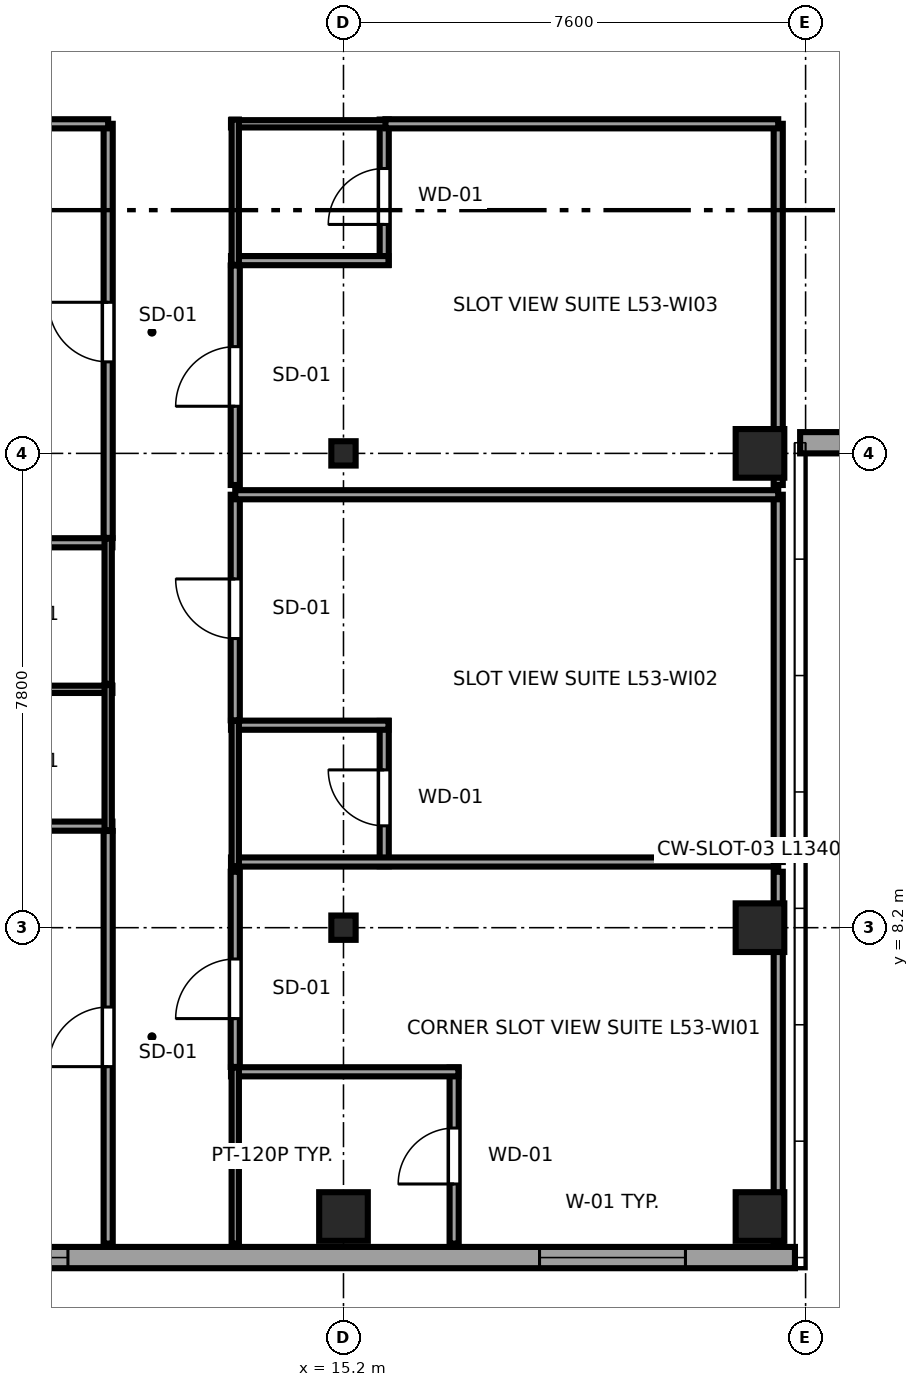
"""IFC4 building model, lengths in metres.
Left out: names, types, materials, properties, quantities, classifications, styles, units other than length and angle.
Written with IfcOpenShell. Run it as: python <this file> out.ifc"""

import sys

from ifc_helpers import new_model, si_unit, direction, frame, frame_2d, origin, origin_2d, place, context, subcontext, project, spatial, rectangle, i_section, extrude, source, transform, mapped, element, fill, save


model = new_model("IFC4")
c1 = context("Model", 3, precision=1e-05, world=origin(), true_north=direction((0.0, 1.0)))
c2 = subcontext(c1, "Body", "Model", "MODEL_VIEW")
j1 = project(units=[si_unit("LENGTHUNIT", "METRE"), si_unit("PLANEANGLEUNIT", "RADIAN")], contexts=[c1])
p1 = place(None, origin())
s1 = spatial("IfcSite", under=j1, at=p1, CompositionType="ELEMENT")
p2 = place(p1, origin())
s2 = spatial("IfcBuilding", under=s1, at=p2, CompositionType="ELEMENT")
p3 = place(p2, frame((0.0, 0.0, 201.75)))
s3 = spatial("IfcBuildingStorey", under=s2, at=p3, CompositionType="ELEMENT", Elevation=201.75)
m1 = source(origin(), c2, "Body", "SweptSolid", [
    extrude(rectangle(XDim=0.8, YDim=0.8, at=origin_2d()), origin(), (0.0, 0.0, 1.0), 3.55),
])
p4 = place(p3, frame((15.2, 3.45, 0.0), z_axis=(0.0, 0.0, 1.0), x_axis=(1.0, 0.0, 0.0)))
e1 = element("IfcColumn", 1, at=p4, inside=s3, PredefinedType="COLUMN", context=c2, shape_type="MappedRepresentation", body=[
    mapped(m1, transform((0.0, 0.0, 0.0), x_axis=(1.0, 0.0, 0.0), y_axis=(0.0, 1.0, 0.0), z_axis=(0.0, 0.0, 1.0), scale=1.0)),
])
m2 = source(origin(), c2, "Body", "SweptSolid", [
    extrude(i_section(OverallWidth=0.4, OverallDepth=0.4, WebThickness=0.02, FlangeThickness=0.035, at=origin_2d()), origin(), (0.0, 0.0, 1.0), 3.55),
])
for number, where, z_axis, x_axis in (
    (2, (15.2, 8.2, 0.0), (0.0, 0.0, 1.0), (1.0, 0.0, 0.0)),
    (3, (15.2, 16.0, 0.0), (0.0, 0.0, 1.0), (1.0, 0.0, 0.0)),
):
    element("IfcColumn", number, at=place(p3, frame(where, z_axis=z_axis, x_axis=x_axis)), inside=s3, PredefinedType="COLUMN", context=c2, shape_type="MappedRepresentation", body=[
        mapped(m2, transform((0.0, 0.0, 0.0), x_axis=(1.0, 0.0, 0.0), y_axis=(0.0, 1.0, 0.0), z_axis=(0.0, 0.0, 1.0), scale=1.0)),
    ])
for number, where, z_axis, x_axis in (
    (4, (22.05, 3.45, 0.0), (0.0, 0.0, 1.0), (1.0, 0.0, 0.0)),
    (5, (22.05, 8.2, 0.0), (0.0, 0.0, 1.0), (1.0, 0.0, 0.0)),
    (6, (22.05, 16.0, 0.0), (0.0, 0.0, 1.0), (1.0, 0.0, 0.0)),
):
    element("IfcColumn", number, at=place(p3, frame(where, z_axis=z_axis, x_axis=x_axis)), inside=s3, PredefinedType="COLUMN", context=c2, shape_type="MappedRepresentation", body=[
        mapped(m1, transform((0.0, 0.0, 0.0), x_axis=(1.0, 0.0, 0.0), y_axis=(0.0, 1.0, 0.0), z_axis=(0.0, 0.0, 1.0), scale=1.0)),
    ])
p5 = place(p3, frame((7.017, 2.775, 0.0), z_axis=(0.0, 0.0, 1.0), x_axis=(1.0, 0.0, 0.0)))
e7 = element("IfcWall", 7, at=p5, inside=s3, PredefinedType="SOLIDWALL", context=c2, shape_type="SweptSolid", body=[
    extrude(rectangle(XDim=15.608, YDim=0.35, at=frame_2d((7.804, 0.0))), origin(), (0.0, 0.0, 1.0), 3.29),
])
p6 = place(p5, frame((1.251, 0.0, 0.68)))
e8 = element("IfcOpeningElement", 8, at=p6, cuts=e7, PredefinedType="OPENING", context=c2, shape_type="SweptSolid", body=[
    extrude(rectangle(XDim=2.4, YDim=1.9, at=frame_2d((1.2, 0.95))), frame((0.0, 0.185, 0.0), z_axis=(0.0, -1.0, 0.0), x_axis=(1.0, 0.0, 0.0)), (0.0, 0.0, 1.0), 0.37),
])
p7 = place(p5, frame((11.407, 0.0, 0.68)))
e9 = element("IfcOpeningElement", 9, at=p7, cuts=e7, PredefinedType="OPENING", context=c2, shape_type="SweptSolid", body=[
    extrude(rectangle(XDim=2.4, YDim=1.9, at=frame_2d((1.2, 0.95))), frame((0.0, 0.185, 0.0), z_axis=(0.0, -1.0, 0.0), x_axis=(1.0, 0.0, 0.0)), (0.0, 0.0, 1.0), 0.37),
])
p8 = place(p3, frame((22.71, 16.175, 0.0), z_axis=(0.0, 0.0, 1.0), x_axis=(1.0, 0.0, 0.0)))
e10 = element("IfcWall", 10, at=p8, inside=s3, PredefinedType="SOLIDWALL", context=c2, shape_type="SweptSolid", body=[
    extrude(rectangle(XDim=11.58, YDim=0.35, at=frame_2d((5.79, 0.0))), origin(), (0.0, 0.0, 1.0), 2.08),
])
p9 = place(p3, frame((8.81, 9.87, 0.0), z_axis=(0.0, 0.0, 1.0), x_axis=(1.0, 0.0, 0.0)))
e11 = element("IfcWall", 11, at=p9, inside=s3, PredefinedType="PARTITIONING", context=c2, shape_type="SweptSolid", body=[
    extrude(rectangle(XDim=2.59, YDim=0.15, at=frame_2d((1.295, 0.0))), origin(), (0.0, 0.0, 1.0), 3.29),
])
p10 = place(p3, frame((8.81, 12.12, 0.0), z_axis=(0.0, 0.0, 1.0), x_axis=(1.0, 0.0, 0.0)))
e12 = element("IfcWall", 12, at=p10, inside=s3, PredefinedType="PLUMBINGWALL", context=c2, shape_type="SweptSolid", body=[
    extrude(rectangle(XDim=2.59, YDim=0.12, at=frame_2d((1.295, 0.0))), origin(), (0.0, 0.0, 1.0), 3.29),
])
p11 = place(p3, frame((11.33, 9.8, 0.0), z_axis=(0.0, 0.0, 1.0), x_axis=(0.0, 1.0, 0.0)))
e13 = element("IfcWall", 13, at=p11, inside=s3, PredefinedType="PLUMBINGWALL", context=c2, shape_type="SweptSolid", body=[
    extrude(rectangle(XDim=2.39, YDim=0.12, at=frame_2d((1.195, 0.0))), origin(), (0.0, 0.0, 1.0), 2.921),
])
p12 = place(p3, frame((8.81, 14.53, 0.0), z_axis=(0.0, 0.0, 1.0), x_axis=(1.0, 0.0, 0.0)))
e14 = element("IfcWall", 14, at=p12, inside=s3, PredefinedType="PARTITIONING", context=c2, shape_type="SweptSolid", body=[
    extrude(rectangle(XDim=2.59, YDim=0.15, at=frame_2d((1.295, 0.0))), origin(), (0.0, 0.0, 1.0), 3.29),
])
p13 = place(p3, frame((11.33, 12.21, 0.0), z_axis=(0.0, 0.0, 1.0), x_axis=(0.0, 1.0, 0.0)))
e15 = element("IfcWall", 15, at=p13, inside=s3, PredefinedType="PLUMBINGWALL", context=c2, shape_type="SweptSolid", body=[
    extrude(rectangle(XDim=2.39, YDim=0.12, at=frame_2d((1.195, 0.0))), origin(), (0.0, 0.0, 1.0), 2.921),
])
p14 = place(p3, frame((17.02, 3.005, 0.0), z_axis=(0.0, 0.0, 1.0), x_axis=(0.0, 1.0, 0.0)))
e16 = element("IfcWall", 16, at=p14, inside=s3, PredefinedType="PARTITIONING", context=c2, shape_type="SweptSolid", body=[
    extrude(rectangle(XDim=2.895, YDim=0.15, at=frame_2d((1.448, 0.0))), origin(), (0.0, 0.0, 1.0), 3.29),
])
p15 = place(p14, frame((0.98, 0.0, 0.0)))
e17 = element("IfcOpeningElement", 17, at=p15, cuts=e16, PredefinedType="OPENING", context=c2, shape_type="SweptSolid", body=[
    extrude(rectangle(XDim=0.92, YDim=2.01, at=frame_2d((0.46, 1.005))), frame((0.0, 0.085, 0.0), z_axis=(0.0, -1.0, 0.0), x_axis=(1.0, 0.0, 0.0)), (0.0, 0.0, 1.0), 0.17),
])
p16 = place(p3, frame((13.35, 5.83, 0.0), z_axis=(0.0, 0.0, 1.0), x_axis=(1.0, 0.0, 0.0)))
e18 = element("IfcWall", 18, at=p16, inside=s3, PredefinedType="PARTITIONING", context=c2, shape_type="SweptSolid", body=[
    extrude(rectangle(XDim=3.74, YDim=0.15, at=frame_2d((1.87, 0.0))), origin(), (0.0, 0.0, 1.0), 3.29),
])
p17 = place(p3, frame((13.42, 3.005, 0.0), z_axis=(0.0, 0.0, 1.0), x_axis=(0.0, 1.0, 0.0)))
e19 = element("IfcWall", 19, at=p17, inside=s3, PredefinedType="PLUMBINGWALL", context=c2, shape_type="SweptSolid", body=[
    extrude(rectangle(XDim=2.895, YDim=0.12, at=frame_2d((1.448, 0.0))), origin(), (0.0, 0.0, 1.0), 3.29),
])
p18 = place(p3, frame((15.87, 9.21, 0.0), z_axis=(0.0, 0.0, 1.0), x_axis=(0.0, 1.0, 0.0)))
e20 = element("IfcWall", 20, at=p18, inside=s3, PredefinedType="PARTITIONING", context=c2, shape_type="SweptSolid", body=[
    extrude(rectangle(XDim=2.39, YDim=0.15, at=frame_2d((1.195, 0.0))), origin(), (0.0, 0.0, 1.0), 3.29),
])
p19 = place(p18, frame((0.665, 0.0, 0.0)))
e21 = element("IfcOpeningElement", 21, at=p19, cuts=e20, PredefinedType="OPENING", context=c2, shape_type="SweptSolid", body=[
    extrude(rectangle(XDim=0.92, YDim=2.01, at=frame_2d((0.46, 1.005))), frame((0.0, 0.085, 0.0), z_axis=(0.0, -1.0, 0.0), x_axis=(1.0, 0.0, 0.0)), (0.0, 0.0, 1.0), 0.17),
])
p20 = place(p3, frame((13.35, 9.28, 0.0), z_axis=(0.0, 0.0, 1.0), x_axis=(1.0, 0.0, 0.0)))
e22 = element("IfcWall", 22, at=p20, inside=s3, PredefinedType="PARTITIONING", context=c2, shape_type="SweptSolid", body=[
    extrude(rectangle(XDim=9.0, YDim=0.15, at=frame_2d((4.5, 0.0))), origin(), (0.0, 0.0, 1.0), 3.29),
])
p21 = place(p3, frame((13.35, 11.53, 0.0), z_axis=(0.0, 0.0, 1.0), x_axis=(1.0, 0.0, 0.0)))
e23 = element("IfcWall", 23, at=p21, inside=s3, PredefinedType="PARTITIONING", context=c2, shape_type="SweptSolid", body=[
    extrude(rectangle(XDim=2.59, YDim=0.15, at=frame_2d((1.295, 0.0))), origin(), (0.0, 0.0, 1.0), 3.29),
])
p22 = place(p3, frame((13.42, 9.21, 0.0), z_axis=(0.0, 0.0, 1.0), x_axis=(0.0, 1.0, 0.0)))
e24 = element("IfcWall", 24, at=p22, inside=s3, PredefinedType="PLUMBINGWALL", context=c2, shape_type="SweptSolid", body=[
    extrude(rectangle(XDim=2.39, YDim=0.12, at=frame_2d((1.195, 0.0))), origin(), (0.0, 0.0, 1.0), 3.29),
])
p23 = place(p3, frame((15.87, 19.1, 0.0), z_axis=(0.0, 0.0, 1.0), x_axis=(0.0, 1.0, 0.0)))
e25 = element("IfcWall", 25, at=p23, inside=s3, PredefinedType="PARTITIONING", context=c2, shape_type="SweptSolid", body=[
    extrude(rectangle(XDim=2.39, YDim=0.15, at=frame_2d((1.195, 0.0))), origin(), (0.0, 0.0, 1.0), 3.29),
])
p24 = place(p23, frame((0.665, 0.0, 0.0)))
e26 = element("IfcOpeningElement", 26, at=p24, cuts=e25, PredefinedType="OPENING", context=c2, shape_type="SweptSolid", body=[
    extrude(rectangle(XDim=0.92, YDim=2.01, at=frame_2d((0.46, 1.005))), frame((0.0, 0.085, 0.0), z_axis=(0.0, -1.0, 0.0), x_axis=(1.0, 0.0, 0.0)), (0.0, 0.0, 1.0), 0.17),
])
p25 = place(p3, frame((13.35, 19.17, 0.0), z_axis=(0.0, 0.0, 1.0), x_axis=(1.0, 0.0, 0.0)))
e27 = element("IfcWall", 27, at=p25, inside=s3, PredefinedType="PARTITIONING", context=c2, shape_type="SweptSolid", body=[
    extrude(rectangle(XDim=2.59, YDim=0.15, at=frame_2d((1.295, 0.0))), origin(), (0.0, 0.0, 1.0), 3.29),
])
p26 = place(p3, frame((13.35, 21.42, 0.0), z_axis=(0.0, 0.0, 1.0), x_axis=(1.0, 0.0, 0.0)))
e28 = element("IfcWall", 28, at=p26, inside=s3, PredefinedType="PLUMBINGWALL", context=c2, shape_type="SweptSolid", body=[
    extrude(rectangle(XDim=2.59, YDim=0.12, at=frame_2d((1.295, 0.0))), origin(), (0.0, 0.0, 1.0), 3.29),
])
p27 = place(p3, frame((13.42, 19.1, 0.0), z_axis=(0.0, 0.0, 1.0), x_axis=(0.0, 1.0, 0.0)))
e29 = element("IfcWall", 29, at=p27, inside=s3, PredefinedType="PLUMBINGWALL", context=c2, shape_type="SweptSolid", body=[
    extrude(rectangle(XDim=2.39, YDim=0.12, at=frame_2d((1.195, 0.0))), origin(), (0.0, 0.0, 1.0), 3.29),
])
p28 = place(p3, frame((11.33, 3.005, 0.0), z_axis=(0.0, 0.0, 1.0), x_axis=(0.0, 1.0, 0.0)))
e30 = element("IfcWall", 30, at=p28, inside=s3, PredefinedType="PARTITIONING", context=c2, shape_type="SweptSolid", body=[
    extrude(rectangle(XDim=6.785, YDim=0.15, at=frame_2d((3.393, 0.0))), origin(), (0.0, 0.0, 1.0), 2.921),
])
p29 = place(p28, frame((2.91, 0.0, 0.0)))
e31 = element("IfcOpeningElement", 31, at=p29, cuts=e30, PredefinedType="OPENING", context=c2, shape_type="SweptSolid", body=[
    extrude(rectangle(XDim=0.98, YDim=2.12, at=frame_2d((0.49, 1.06))), frame((0.0, 0.085, 0.0), z_axis=(0.0, -1.0, 0.0), x_axis=(1.0, 0.0, 0.0)), (0.0, 0.0, 1.0), 0.17),
])
p30 = place(p3, frame((11.33, 14.61, 0.0), z_axis=(0.0, 0.0, 1.0), x_axis=(0.0, 1.0, 0.0)))
e32 = element("IfcWall", 32, at=p30, inside=s3, PredefinedType="PARTITIONING", context=c2, shape_type="SweptSolid", body=[
    extrude(rectangle(XDim=6.81, YDim=0.15, at=frame_2d((3.405, 0.0))), origin(), (0.0, 0.0, 1.0), 2.921),
])
p31 = place(p30, frame((2.895, 0.0, 0.0)))
e33 = element("IfcOpeningElement", 33, at=p31, cuts=e32, PredefinedType="OPENING", context=c2, shape_type="SweptSolid", body=[
    extrude(rectangle(XDim=0.98, YDim=2.12, at=frame_2d((0.49, 1.06))), frame((0.0, 0.085, 0.0), z_axis=(0.0, -1.0, 0.0), x_axis=(1.0, 0.0, 0.0)), (0.0, 0.0, 1.0), 0.17),
])
p32 = place(p3, frame((3.005, 21.42, 0.0), z_axis=(0.0, 0.0, 1.0), x_axis=(1.0, 0.0, 0.0)))
e34 = element("IfcWall", 34, at=p32, inside=s3, PredefinedType="PARTITIONING", context=c2, shape_type="SweptSolid", body=[
    extrude(rectangle(XDim=8.325, YDim=0.15, at=frame_2d((4.163, 0.0))), origin(), (0.0, 0.0, 1.0), 3.29),
])
p33 = place(p3, frame((13.42, 5.91, 0.0), z_axis=(0.0, 0.0, 1.0), x_axis=(0.0, 1.0, 0.0)))
e35 = element("IfcWall", 35, at=p33, inside=s3, PredefinedType="PARTITIONING", context=c2, shape_type="SweptSolid", body=[
    extrude(rectangle(XDim=3.21, YDim=0.15, at=frame_2d((1.605, 0.0))), origin(), (0.0, 0.0, 1.0), 3.29),
])
p34 = place(p33, frame((0.795, 0.0, 0.0)))
e36 = element("IfcOpeningElement", 36, at=p34, cuts=e35, PredefinedType="OPENING", context=c2, shape_type="SweptSolid", body=[
    extrude(rectangle(XDim=0.98, YDim=2.12, at=frame_2d((0.49, 1.06))), frame((0.0, 0.085, 0.0), z_axis=(0.0, -1.0, 0.0), x_axis=(1.0, 0.0, 0.0)), (0.0, 0.0, 1.0), 0.17),
])
p35 = place(p3, frame((22.35, 3.005, 0.0), z_axis=(0.0, 0.0, 1.0), x_axis=(0.0, 1.0, 0.0)))
e37 = element("IfcWall", 37, at=p35, inside=s3, PredefinedType="PARTITIONING", context=c2, shape_type="SweptSolid", body=[
    extrude(rectangle(XDim=6.115, YDim=0.15, at=frame_2d((3.058, 0.0))), origin(), (0.0, 0.0, 1.0), 2.08),
])
p36 = place(p3, frame((13.42, 11.61, 0.0), z_axis=(0.0, 0.0, 1.0), x_axis=(0.0, 1.0, 0.0)))
e38 = element("IfcWall", 38, at=p36, inside=s3, PredefinedType="PARTITIONING", context=c2, shape_type="SweptSolid", body=[
    extrude(rectangle(XDim=3.71, YDim=0.15, at=frame_2d((1.855, 0.0))), origin(), (0.0, 0.0, 1.0), 3.29),
])
p37 = place(p36, frame((1.345, 0.0, 0.0)))
e39 = element("IfcOpeningElement", 39, at=p37, cuts=e38, PredefinedType="OPENING", context=c2, shape_type="SweptSolid", body=[
    extrude(rectangle(XDim=0.98, YDim=2.12, at=frame_2d((0.49, 1.06))), frame((0.0, 0.085, 0.0), z_axis=(0.0, -1.0, 0.0), x_axis=(1.0, 0.0, 0.0)), (0.0, 0.0, 1.0), 0.17),
])
p38 = place(p3, frame((22.35, 9.28, 0.0), z_axis=(0.0, 0.0, 1.0), x_axis=(0.0, 1.0, 0.0)))
e40 = element("IfcWall", 40, at=p38, inside=s3, PredefinedType="PARTITIONING", context=c2, shape_type="SweptSolid", body=[
    extrude(rectangle(XDim=6.04, YDim=0.15, at=frame_2d((3.02, 0.0))), origin(), (0.0, 0.0, 1.0), 2.08),
])
p39 = place(p3, frame((13.42, 15.32, 0.0), z_axis=(0.0, 0.0, 1.0), x_axis=(1.0, 0.0, 0.0)))
e41 = element("IfcWall", 41, at=p39, inside=s3, PredefinedType="PARTITIONING", context=c2, shape_type="SweptSolid", body=[
    extrude(rectangle(XDim=8.93, YDim=0.15, at=frame_2d((4.465, 0.0))), origin(), (0.0, 0.0, 1.0), 3.29),
])
p40 = place(p3, frame((13.42, 15.48, 0.0), z_axis=(0.0, 0.0, 1.0), x_axis=(0.0, 1.0, 0.0)))
e42 = element("IfcWall", 42, at=p40, inside=s3, PredefinedType="PARTITIONING", context=c2, shape_type="SweptSolid", body=[
    extrude(rectangle(XDim=3.61, YDim=0.15, at=frame_2d((1.805, 0.0))), origin(), (0.0, 0.0, 1.0), 3.29),
])
p41 = place(p40, frame((1.295, 0.0, 0.0)))
e43 = element("IfcOpeningElement", 43, at=p41, cuts=e42, PredefinedType="OPENING", context=c2, shape_type="SweptSolid", body=[
    extrude(rectangle(XDim=0.98, YDim=2.12, at=frame_2d((0.49, 1.06))), frame((0.0, 0.085, 0.0), z_axis=(0.0, -1.0, 0.0), x_axis=(1.0, 0.0, 0.0)), (0.0, 0.0, 1.0), 0.17),
])
p42 = place(p3, frame((22.35, 15.48, 0.0), z_axis=(0.0, 0.0, 1.0), x_axis=(0.0, 1.0, 0.0)))
e44 = element("IfcWall", 44, at=p42, inside=s3, PredefinedType="PARTITIONING", context=c2, shape_type="SweptSolid", body=[
    extrude(rectangle(XDim=5.94, YDim=0.15, at=frame_2d((2.97, 0.0))), origin(), (0.0, 0.0, 1.0), 2.08),
])
p43 = place(p3, frame((15.89, 21.42, 0.0), z_axis=(0.0, 0.0, 1.0), x_axis=(1.0, 0.0, 0.0)))
e45 = element("IfcWall", 45, at=p43, inside=s3, PredefinedType="PARTITIONING", context=c2, shape_type="SweptSolid", body=[
    extrude(rectangle(XDim=6.46, YDim=0.15, at=frame_2d((3.23, 0.0))), origin(), (0.0, 0.0, 1.0), 3.29),
])
m3 = source(origin(), c2, "Body", "SweptSolid", [
    extrude(rectangle(XDim=2.4, YDim=1.9, at=frame_2d((1.2, 0.95))), frame((0.0, 0.09, 0.0), z_axis=(0.0, -1.0, 0.0), x_axis=(1.0, 0.0, 0.0)), (0.0, 0.0, 1.0), 0.06),
])
p44 = place(p6, origin())
e46 = element("IfcWindow", 46, at=p44, inside=s3, PartitioningType="TRIPLE_PANEL_HORIZONTAL", PredefinedType="WINDOW", context=c2, shape_type="MappedRepresentation", body=[
    mapped(m3, transform((0.0, 0.0, 0.0), x_axis=(1.0, 0.0, 0.0), y_axis=(0.0, 1.0, 0.0), z_axis=(0.0, 0.0, 1.0), scale=1.0)),
])
fill(e8, e46)
p45 = place(p7, origin())
e47 = element("IfcWindow", 47, at=p45, inside=s3, PartitioningType="TRIPLE_PANEL_HORIZONTAL", PredefinedType="WINDOW", context=c2, shape_type="MappedRepresentation", body=[
    mapped(m3, transform((0.0, 0.0, 0.0), x_axis=(1.0, 0.0, 0.0), y_axis=(0.0, 1.0, 0.0), z_axis=(0.0, 0.0, 1.0), scale=1.0)),
])
fill(e9, e47)
m4 = source(origin(), c2, "Body", "SweptSolid", [
    extrude(rectangle(XDim=0.92, YDim=2.01, at=frame_2d((0.46, 1.005))), frame((0.0, 0.025, 0.0), z_axis=(0.0, -1.0, 0.0), x_axis=(1.0, 0.0, 0.0)), (0.0, 0.0, 1.0), 0.05),
])
p46 = place(p15, origin())
e48 = element("IfcDoor", 48, at=p46, inside=s3, OperationType="SINGLE_SWING_LEFT", PredefinedType="DOOR", context=c2, shape_type="MappedRepresentation", body=[
    mapped(m4, transform((0.0, 0.0, 0.0), x_axis=(1.0, 0.0, 0.0), y_axis=(0.0, 1.0, 0.0), z_axis=(0.0, 0.0, 1.0), scale=1.0)),
])
fill(e17, e48)
p47 = place(p19, origin())
e49 = element("IfcDoor", 49, at=p47, inside=s3, OperationType="SINGLE_SWING_RIGHT", PredefinedType="DOOR", context=c2, shape_type="MappedRepresentation", body=[
    mapped(m4, transform((0.0, 0.0, 0.0), x_axis=(1.0, 0.0, 0.0), y_axis=(0.0, 1.0, 0.0), z_axis=(0.0, 0.0, 1.0), scale=1.0)),
])
fill(e21, e49)
p48 = place(p24, origin())
e50 = element("IfcDoor", 50, at=p48, inside=s3, OperationType="SINGLE_SWING_LEFT", PredefinedType="DOOR", context=c2, shape_type="MappedRepresentation", body=[
    mapped(m4, transform((0.0, 0.0, 0.0), x_axis=(1.0, 0.0, 0.0), y_axis=(0.0, 1.0, 0.0), z_axis=(0.0, 0.0, 1.0), scale=1.0)),
])
fill(e26, e50)
m5 = source(origin(), c2, "Body", "SweptSolid", [
    extrude(rectangle(XDim=0.98, YDim=2.12, at=frame_2d((0.49, 1.06))), frame((0.0, 0.025, 0.0), z_axis=(0.0, -1.0, 0.0), x_axis=(1.0, 0.0, 0.0)), (0.0, 0.0, 1.0), 0.05),
])
p49 = place(p29, origin())
e51 = element("IfcDoor", 51, at=p49, inside=s3, OperationType="SINGLE_SWING_LEFT", PredefinedType="DOOR", context=c2, shape_type="MappedRepresentation", body=[
    mapped(m5, transform((0.0, 0.0, 0.0), x_axis=(1.0, 0.0, 0.0), y_axis=(0.0, 1.0, 0.0), z_axis=(0.0, 0.0, 1.0), scale=1.0)),
])
fill(e31, e51)
p50 = place(p31, origin())
e52 = element("IfcDoor", 52, at=p50, inside=s3, OperationType="SINGLE_SWING_RIGHT", PredefinedType="DOOR", context=c2, shape_type="MappedRepresentation", body=[
    mapped(m5, transform((0.0, 0.0, 0.0), x_axis=(1.0, 0.0, 0.0), y_axis=(0.0, 1.0, 0.0), z_axis=(0.0, 0.0, 1.0), scale=1.0)),
])
fill(e33, e52)
p51 = place(p34, origin())
e53 = element("IfcDoor", 53, at=p51, inside=s3, OperationType="SINGLE_SWING_LEFT", PredefinedType="DOOR", context=c2, shape_type="MappedRepresentation", body=[
    mapped(m5, transform((0.0, 0.0, 0.0), x_axis=(1.0, 0.0, 0.0), y_axis=(0.0, 1.0, 0.0), z_axis=(0.0, 0.0, 1.0), scale=1.0)),
])
fill(e36, e53)
p52 = place(p37, origin())
e54 = element("IfcDoor", 54, at=p52, inside=s3, OperationType="SINGLE_SWING_RIGHT", PredefinedType="DOOR", context=c2, shape_type="MappedRepresentation", body=[
    mapped(m5, transform((0.0, 0.0, 0.0), x_axis=(1.0, 0.0, 0.0), y_axis=(0.0, 1.0, 0.0), z_axis=(0.0, 0.0, 1.0), scale=1.0)),
])
fill(e39, e54)
p53 = place(p41, origin())
e55 = element("IfcDoor", 55, at=p53, inside=s3, OperationType="SINGLE_SWING_LEFT", PredefinedType="DOOR", context=c2, shape_type="MappedRepresentation", body=[
    mapped(m5, transform((0.0, 0.0, 0.0), x_axis=(1.0, 0.0, 0.0), y_axis=(0.0, 1.0, 0.0), z_axis=(0.0, 0.0, 1.0), scale=1.0)),
])
fill(e43, e55)
save(model, sys.argv[1])
